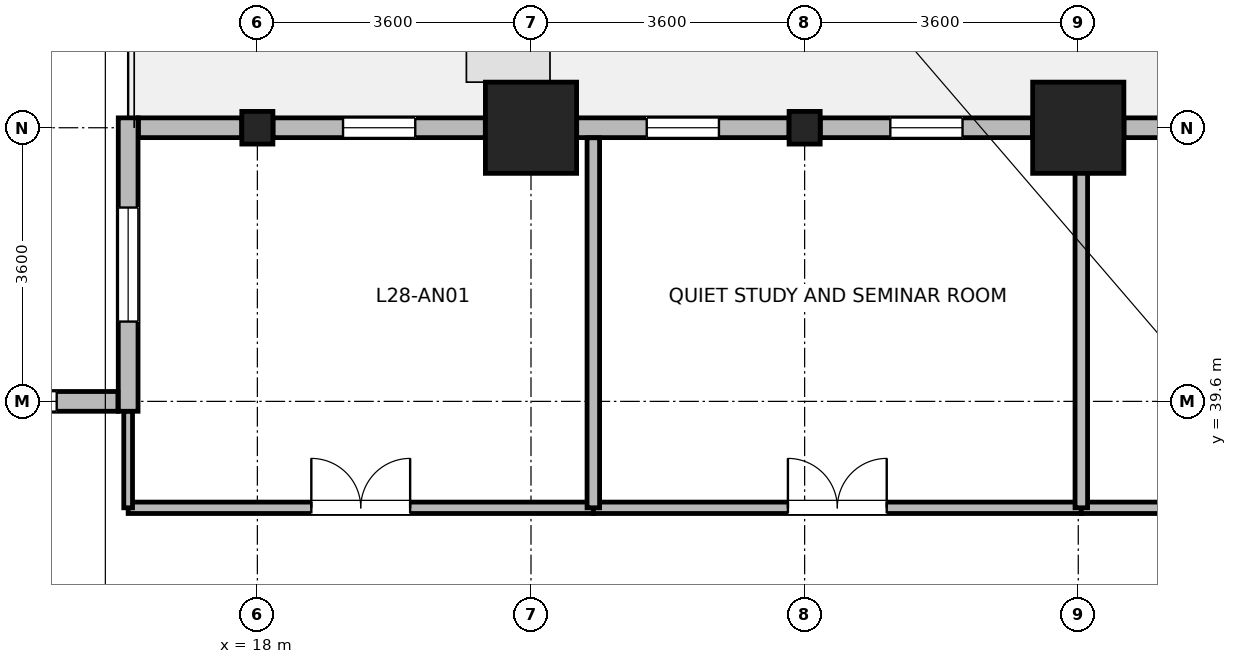
"""IFC4 building model, lengths in metres.
Left out: names, types, materials, properties, quantities, classifications, styles, units other than length and angle.
Written with IfcOpenShell. Run it as: python <this file> out.ifc"""

import sys

from ifc_helpers import new_model, si_unit, direction, frame, frame_2d, origin, origin_2d, place, context, subcontext, project, spatial, rectangle, i_section, extrude, source, transform, mapped, element, fill, save


model = new_model("IFC4")
c1 = context("Model", 3, precision=1e-05, world=origin(), true_north=direction((0.0, 1.0)))
c2 = subcontext(c1, "Body", "Model", "MODEL_VIEW")
j1 = project(units=[si_unit("LENGTHUNIT", "METRE"), si_unit("PLANEANGLEUNIT", "RADIAN")], contexts=[c1])
p1 = place(None, origin())
s1 = spatial("IfcSite", under=j1, at=p1, CompositionType="ELEMENT")
p2 = place(p1, origin())
s2 = spatial("IfcBuilding", under=s1, at=p2, CompositionType="ELEMENT")
p3 = place(p2, frame((0.0, 0.0, 111.9)))
s3 = spatial("IfcBuildingStorey", under=s2, at=p3, CompositionType="ELEMENT", Elevation=111.9)
m1 = source(origin(), c2, "Body", "SweptSolid", [
    extrude(rectangle(XDim=1.2, YDim=1.2, at=origin_2d()), origin(), (0.0, 0.0, 1.0), 3.7),
])
for number, where, z_axis, x_axis in (
    (1, (21.6, 43.2, 0.0), (0.0, 0.0, 1.0), (1.0, 0.0, 0.0)),
    (2, (28.8, 43.2, 0.0), (0.0, 0.0, 1.0), (1.0, 0.0, 0.0)),
):
    element("IfcColumn", number, at=place(p3, frame(where, z_axis=z_axis, x_axis=x_axis)), inside=s3, PredefinedType="COLUMN", context=c2, shape_type="MappedRepresentation", body=[
        mapped(m1, transform((0.0, 0.0, 0.0), x_axis=(1.0, 0.0, 0.0), y_axis=(0.0, 1.0, 0.0), z_axis=(0.0, 0.0, 1.0), scale=1.0)),
    ])
m2 = source(origin(), c2, "Body", "SweptSolid", [
    extrude(i_section(OverallWidth=0.409, OverallDepth=0.43, WebThickness=0.024, FlangeThickness=0.033, FilletRadius=0.015, at=origin_2d()), origin(), (0.0, 0.0, 1.0), 3.7),
])
for number, where, z_axis, x_axis in (
    (3, (18.0, 43.2, 0.0), (0.0, 0.0, 1.0), (1.0, 0.0, 0.0)),
    (4, (25.2, 43.2, 0.0), (0.0, 0.0, 1.0), (1.0, 0.0, 0.0)),
):
    element("IfcColumn", number, at=place(p3, frame(where, z_axis=z_axis, x_axis=x_axis)), inside=s3, PredefinedType="COLUMN", context=c2, shape_type="MappedRepresentation", body=[
        mapped(m2, transform((0.0, 0.0, 0.0), x_axis=(1.0, 0.0, 0.0), y_axis=(0.0, 1.0, 0.0), z_axis=(0.0, 0.0, 1.0), scale=1.0)),
    ])
p4 = place(p3, frame((29.401, 43.2, 0.0), z_axis=(0.0, 0.0, 1.0), x_axis=(1.0, 0.0, 0.0)))
e5 = element("IfcWall", 5, at=p4, inside=s3, PredefinedType="STANDARD", context=c2, shape_type="SweptSolid", body=[
    extrude(rectangle(XDim=2.794, YDim=0.26, at=frame_2d((1.397, 0.0))), origin(), (0.0, 0.0, 1.0), 2.98),
])
p5 = place(p4, frame((0.922, 0.0, 0.85)))
e6 = element("IfcOpeningElement", 6, at=p5, cuts=e5, PredefinedType="OPENING", context=c2, shape_type="SweptSolid", body=[
    extrude(rectangle(XDim=0.95, YDim=1.75, at=frame_2d((0.475, 0.875))), frame((0.0, 0.14, 0.0), z_axis=(0.0, -1.0, 0.0), x_axis=(1.0, 0.0, 0.0)), (0.0, 0.0, 1.0), 0.28),
])
p6 = place(p3, frame((25.406, 43.2, 0.0), z_axis=(0.0, 0.0, 1.0), x_axis=(1.0, 0.0, 0.0)))
e7 = element("IfcWall", 7, at=p6, inside=s3, PredefinedType="STANDARD", context=c2, shape_type="SweptSolid", body=[
    extrude(rectangle(XDim=2.793, YDim=0.26, at=frame_2d((1.397, 0.0))), origin(), (0.0, 0.0, 1.0), 2.98),
])
p7 = place(p6, frame((0.922, 0.0, 0.85)))
e8 = element("IfcOpeningElement", 8, at=p7, cuts=e7, PredefinedType="OPENING", context=c2, shape_type="SweptSolid", body=[
    extrude(rectangle(XDim=0.95, YDim=1.75, at=frame_2d((0.475, 0.875))), frame((0.0, 0.14, 0.0), z_axis=(0.0, -1.0, 0.0), x_axis=(1.0, 0.0, 0.0)), (0.0, 0.0, 1.0), 0.28),
])
p8 = place(p3, frame((22.201, 43.2, 0.0), z_axis=(0.0, 0.0, 1.0), x_axis=(1.0, 0.0, 0.0)))
e9 = element("IfcWall", 9, at=p8, inside=s3, PredefinedType="STANDARD", context=c2, shape_type="SweptSolid", body=[
    extrude(rectangle(XDim=2.793, YDim=0.26, at=frame_2d((1.397, 0.0))), origin(), (0.0, 0.0, 1.0), 2.98),
])
p9 = place(p8, frame((0.922, 0.0, 0.85)))
e10 = element("IfcOpeningElement", 10, at=p9, cuts=e9, PredefinedType="OPENING", context=c2, shape_type="SweptSolid", body=[
    extrude(rectangle(XDim=0.95, YDim=1.75, at=frame_2d((0.475, 0.875))), frame((0.0, 0.14, 0.0), z_axis=(0.0, -1.0, 0.0), x_axis=(1.0, 0.0, 0.0)), (0.0, 0.0, 1.0), 0.28),
])
p10 = place(p3, frame((18.206, 43.2, 0.0), z_axis=(0.0, 0.0, 1.0), x_axis=(1.0, 0.0, 0.0)))
e11 = element("IfcWall", 11, at=p10, inside=s3, PredefinedType="STANDARD", context=c2, shape_type="SweptSolid", body=[
    extrude(rectangle(XDim=2.793, YDim=0.26, at=frame_2d((1.397, 0.0))), origin(), (0.0, 0.0, 1.0), 2.98),
])
p11 = place(p10, frame((0.922, 0.0, 0.85)))
e12 = element("IfcOpeningElement", 12, at=p11, cuts=e11, PredefinedType="OPENING", context=c2, shape_type="SweptSolid", body=[
    extrude(rectangle(XDim=0.95, YDim=1.75, at=frame_2d((0.475, 0.875))), frame((0.0, 0.14, 0.0), z_axis=(0.0, -1.0, 0.0), x_axis=(1.0, 0.0, 0.0)), (0.0, 0.0, 1.0), 0.28),
])
p12 = place(p3, frame((16.435, 43.2, 0.0), z_axis=(0.0, 0.0, 1.0), x_axis=(1.0, 0.0, 0.0)))
e13 = element("IfcWall", 13, at=p12, inside=s3, PredefinedType="STANDARD", context=c2, shape_type="SweptSolid", body=[
    extrude(rectangle(XDim=1.359, YDim=0.26, at=frame_2d((0.68, 0.0))), origin(), (0.0, 0.0, 1.0), 2.98),
])
p13 = place(p3, frame((16.3, 39.47, 0.0), z_axis=(0.0, 0.0, 1.0), x_axis=(0.0, 1.0, 0.0)))
e14 = element("IfcWall", 14, at=p13, inside=s3, PredefinedType="STANDARD", context=c2, shape_type="SweptSolid", body=[
    extrude(rectangle(XDim=3.86, YDim=0.26, at=frame_2d((1.93, 0.0))), origin(), (0.0, 0.0, 1.0), 3.43),
])
p14 = place(p13, frame((1.18, 0.0, 0.85)))
e15 = element("IfcOpeningElement", 15, at=p14, cuts=e14, PredefinedType="OPENING", context=c2, shape_type="SweptSolid", body=[
    extrude(rectangle(XDim=1.5, YDim=1.85, at=frame_2d((0.75, 0.925))), frame((0.0, 0.14, 0.0), z_axis=(0.0, -1.0, 0.0), x_axis=(1.0, 0.0, 0.0)), (0.0, 0.0, 1.0), 0.28),
])
p15 = place(p3, frame((6.835, 39.6, 0.0), z_axis=(0.0, 0.0, 1.0), x_axis=(1.0, 0.0, 0.0)))
e16 = element("IfcWall", 16, at=p15, inside=s3, PredefinedType="STANDARD", context=c2, shape_type="SweptSolid", body=[
    extrude(rectangle(XDim=9.33, YDim=0.26, at=frame_2d((4.665, 0.0))), origin(), (0.0, 0.0, 1.0), 3.43),
])
p16 = place(p15, frame((0.805, 0.0, 0.85)))
e17 = element("IfcOpeningElement", 17, at=p16, cuts=e16, PredefinedType="OPENING", context=c2, shape_type="SweptSolid", body=[
    extrude(rectangle(XDim=1.5, YDim=1.85, at=frame_2d((0.75, 0.925))), frame((0.0, 0.14, 0.0), z_axis=(0.0, -1.0, 0.0), x_axis=(1.0, 0.0, 0.0)), (0.0, 0.0, 1.0), 0.28),
])
p17 = place(p15, frame((3.915, 0.0, 0.85)))
e18 = element("IfcOpeningElement", 18, at=p17, cuts=e16, PredefinedType="OPENING", context=c2, shape_type="SweptSolid", body=[
    extrude(rectangle(XDim=1.5, YDim=1.85, at=frame_2d((0.75, 0.925))), frame((0.0, 0.14, 0.0), z_axis=(0.0, -1.0, 0.0), x_axis=(1.0, 0.0, 0.0)), (0.0, 0.0, 1.0), 0.28),
])
p18 = place(p15, frame((7.025, 0.0, 0.85)))
e19 = element("IfcOpeningElement", 19, at=p18, cuts=e16, PredefinedType="OPENING", context=c2, shape_type="SweptSolid", body=[
    extrude(rectangle(XDim=1.5, YDim=1.85, at=frame_2d((0.75, 0.925))), frame((0.0, 0.14, 0.0), z_axis=(0.0, -1.0, 0.0), x_axis=(1.0, 0.0, 0.0)), (0.0, 0.0, 1.0), 0.28),
])
p19 = place(p3, frame((22.42, 38.2, 0.0), z_axis=(0.0, 0.0, 1.0), x_axis=(1.0, 0.0, 0.0)))
e20 = element("IfcWall", 20, at=p19, inside=s3, PredefinedType="PARTITIONING", context=c2, shape_type="SweptSolid", body=[
    extrude(rectangle(XDim=6.42, YDim=0.15, at=frame_2d((3.21, 0.0))), origin(), (0.0, 0.0, 1.0), 3.43),
])
p20 = place(p19, frame((2.56, 0.0, 0.0)))
e21 = element("IfcOpeningElement", 21, at=p20, cuts=e20, PredefinedType="OPENING", context=c2, shape_type="SweptSolid", body=[
    extrude(rectangle(XDim=1.3, YDim=2.12, at=frame_2d((0.65, 1.06))), frame((0.0, 0.085, 0.0), z_axis=(0.0, -1.0, 0.0), x_axis=(1.0, 0.0, 0.0)), (0.0, 0.0, 1.0), 0.17),
])
p21 = place(p3, frame((16.3, 38.2, 0.0), z_axis=(0.0, 0.0, 1.0), x_axis=(1.0, 0.0, 0.0)))
e22 = element("IfcWall", 22, at=p21, inside=s3, PredefinedType="PARTITIONING", context=c2, shape_type="SweptSolid", body=[
    extrude(rectangle(XDim=6.12, YDim=0.15, at=frame_2d((3.06, 0.0))), origin(), (0.0, 0.0, 1.0), 3.43),
])
p22 = place(p21, frame((2.41, 0.0, 0.0)))
e23 = element("IfcOpeningElement", 23, at=p22, cuts=e22, PredefinedType="OPENING", context=c2, shape_type="SweptSolid", body=[
    extrude(rectangle(XDim=1.3, YDim=2.12, at=frame_2d((0.65, 1.06))), frame((0.0, 0.085, 0.0), z_axis=(0.0, -1.0, 0.0), x_axis=(1.0, 0.0, 0.0)), (0.0, 0.0, 1.0), 0.17),
])
p23 = place(p3, frame((28.84, 38.2, 0.0), z_axis=(0.0, 0.0, 1.0), x_axis=(1.0, 0.0, 0.0)))
e24 = element("IfcWall", 24, at=p23, inside=s3, PredefinedType="PARTITIONING", context=c2, shape_type="SweptSolid", body=[
    extrude(rectangle(XDim=5.96, YDim=0.15, at=frame_2d((2.98, 0.0))), origin(), (0.0, 0.0, 1.0), 3.43),
])
p24 = place(p23, frame((2.505, 0.0, 0.0)))
e25 = element("IfcOpeningElement", 25, at=p24, cuts=e24, PredefinedType="OPENING", context=c2, shape_type="SweptSolid", body=[
    extrude(rectangle(XDim=0.95, YDim=2.1, at=frame_2d((0.475, 1.05))), frame((0.0, 0.085, 0.0), z_axis=(0.0, -1.0, 0.0), x_axis=(1.0, 0.0, 0.0)), (0.0, 0.0, 1.0), 0.17),
])
p25 = place(p3, frame((16.3, 38.2, 0.0), z_axis=(0.0, 0.0, 1.0), x_axis=(0.0, 1.0, 0.0)))
e26 = element("IfcWall", 26, at=p25, inside=s3, PredefinedType="PARTITIONING", context=c2, shape_type="SweptSolid", body=[
    extrude(rectangle(XDim=1.268, YDim=0.115, at=frame_2d((0.634, 0.0))), origin(), (0.0, 0.0, 1.0), 3.43),
])
p26 = place(p3, frame((22.42, 38.2, 0.0), z_axis=(0.0, 0.0, 1.0), x_axis=(0.0, 1.0, 0.0)))
e27 = element("IfcWall", 27, at=p26, inside=s3, PredefinedType="PARTITIONING", context=c2, shape_type="SweptSolid", body=[
    extrude(rectangle(XDim=4.868, YDim=0.165, at=frame_2d((2.434, 0.0))), origin(), (0.0, 0.0, 1.0), 3.43),
])
p27 = place(p3, frame((28.84, 38.2, 0.0), z_axis=(0.0, 0.0, 1.0), x_axis=(0.0, 1.0, 0.0)))
e28 = element("IfcWall", 28, at=p27, inside=s3, PredefinedType="PARTITIONING", context=c2, shape_type="SweptSolid", body=[
    extrude(rectangle(XDim=4.868, YDim=0.165, at=frame_2d((2.434, 0.0))), origin(), (0.0, 0.0, 1.0), 2.93),
])
p28 = place(p7, origin())
e29 = element("IfcWindow", 29, at=p28, inside=s3, PartitioningType="SINGLE_PANEL", PredefinedType="WINDOW", context=c2, shape_type="SweptSolid", body=[
    extrude(rectangle(XDim=0.95, YDim=1.75, at=frame_2d((0.475, 0.875))), frame((0.0, 0.03, 0.0), z_axis=(0.0, -1.0, 0.0), x_axis=(1.0, 0.0, 0.0)), (0.0, 0.0, 1.0), 0.06),
])
fill(e8, e29)
p29 = place(p9, origin())
e30 = element("IfcWindow", 30, at=p29, inside=s3, PartitioningType="SINGLE_PANEL", PredefinedType="WINDOW", context=c2, shape_type="SweptSolid", body=[
    extrude(rectangle(XDim=0.95, YDim=1.75, at=frame_2d((0.475, 0.875))), frame((0.0, 0.03, 0.0), z_axis=(0.0, -1.0, 0.0), x_axis=(1.0, 0.0, 0.0)), (0.0, 0.0, 1.0), 0.06),
])
fill(e10, e30)
p30 = place(p11, origin())
e31 = element("IfcWindow", 31, at=p30, inside=s3, PartitioningType="SINGLE_PANEL", PredefinedType="WINDOW", context=c2, shape_type="SweptSolid", body=[
    extrude(rectangle(XDim=0.95, YDim=1.75, at=frame_2d((0.475, 0.875))), frame((0.0, 0.03, 0.0), z_axis=(0.0, -1.0, 0.0), x_axis=(1.0, 0.0, 0.0)), (0.0, 0.0, 1.0), 0.06),
])
fill(e12, e31)
p31 = place(p14, origin())
e32 = element("IfcWindow", 32, at=p31, inside=s3, PartitioningType="SINGLE_PANEL", PredefinedType="WINDOW", context=c2, shape_type="SweptSolid", body=[
    extrude(rectangle(XDim=1.5, YDim=1.85, at=frame_2d((0.75, 0.925))), frame((0.0, 0.03, 0.0), z_axis=(0.0, -1.0, 0.0), x_axis=(1.0, 0.0, 0.0)), (0.0, 0.0, 1.0), 0.06),
])
fill(e15, e32)
p32 = place(p18, origin())
e33 = element("IfcWindow", 33, at=p32, inside=s3, PartitioningType="SINGLE_PANEL", PredefinedType="WINDOW", context=c2, shape_type="SweptSolid", body=[
    extrude(rectangle(XDim=1.5, YDim=1.85, at=frame_2d((0.75, 0.925))), frame((0.0, 0.03, 0.0), z_axis=(0.0, -1.0, 0.0), x_axis=(1.0, 0.0, 0.0)), (0.0, 0.0, 1.0), 0.06),
])
fill(e19, e33)
p33 = place(p20, origin())
e34 = element("IfcDoor", 34, at=p33, inside=s3, OperationType="DOUBLE_DOOR_SINGLE_SWING", PredefinedType="DOOR", context=c2, shape_type="SweptSolid", body=[
    extrude(rectangle(XDim=1.3, YDim=2.12, at=frame_2d((0.65, 1.06))), frame((0.0, 0.025, 0.0), z_axis=(0.0, -1.0, 0.0), x_axis=(1.0, 0.0, 0.0)), (0.0, 0.0, 1.0), 0.05),
])
fill(e21, e34)
p34 = place(p22, origin())
e35 = element("IfcDoor", 35, at=p34, inside=s3, OperationType="DOUBLE_DOOR_SINGLE_SWING", PredefinedType="DOOR", context=c2, shape_type="SweptSolid", body=[
    extrude(rectangle(XDim=1.3, YDim=2.12, at=frame_2d((0.65, 1.06))), frame((0.0, 0.025, 0.0), z_axis=(0.0, -1.0, 0.0), x_axis=(1.0, 0.0, 0.0)), (0.0, 0.0, 1.0), 0.05),
])
fill(e23, e35)
save(model, sys.argv[1])
